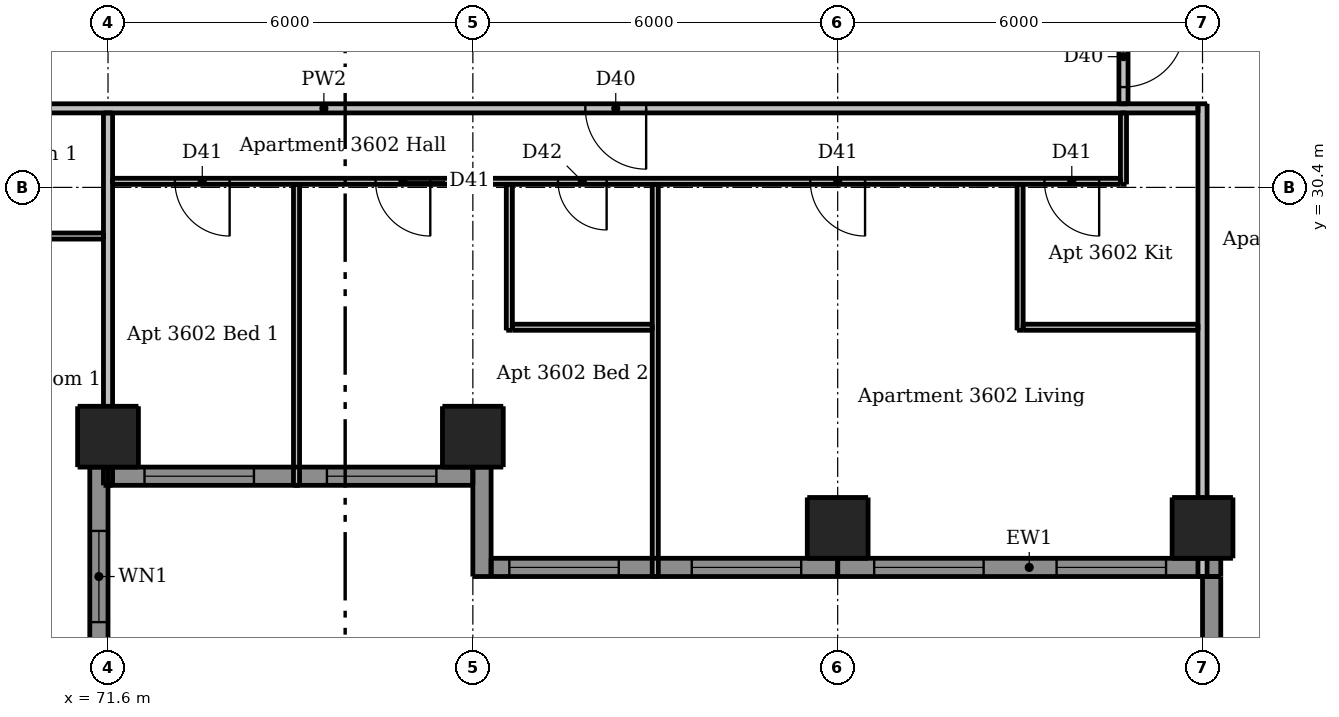
"""IFC4 building model, lengths in metres.
Left out: names, types, materials, properties, quantities, classifications, styles, units other than length and angle.
Written with IfcOpenShell. Run it as: python <this file> out.ifc"""

import sys

from ifc_helpers import new_model, si_unit, direction, frame, frame_2d, origin, origin_2d, place, context, subcontext, project, spatial, rectangle, extrude, element, fill, save


model = new_model("IFC4")
c1 = context("Model", 3, precision=1e-05, world=origin(), true_north=direction((0.0, 1.0)))
c2 = subcontext(c1, "Body", "Model", "MODEL_VIEW")
j1 = project(units=[si_unit("LENGTHUNIT", "METRE"), si_unit("PLANEANGLEUNIT", "RADIAN")], contexts=[c1])
p1 = place(None, origin())
s1 = spatial("IfcSite", under=j1, at=p1, CompositionType="ELEMENT")
p2 = place(p1, origin())
s2 = spatial("IfcBuilding", under=s1, at=p2, CompositionType="ELEMENT")
p3 = place(p2, frame((0.0, 0.0, 137.2)))
s3 = spatial("IfcBuildingStorey", under=s2, at=p3, CompositionType="ELEMENT", Elevation=137.2)
for number, where, z_axis, x_axis in (
    (1, (71.6, 26.3, 0.0), (0.0, 0.0, 1.0), (1.0, 0.0, 0.0)),
    (2, (77.6, 26.3, 0.0), (0.0, 0.0, 1.0), (1.0, 0.0, 0.0)),
    (3, (83.6, 24.8, 0.0), (0.0, 0.0, 1.0), (1.0, 0.0, 0.0)),
    (4, (89.6, 24.8, 0.0), (0.0, 0.0, 1.0), (1.0, 0.0, 0.0)),
):
    element("IfcColumn", number, at=place(p3, frame(where, z_axis=z_axis, x_axis=x_axis)), inside=s3, PredefinedType="COLUMN", context=c2, shape_type="SweptSolid", body=[
        extrude(rectangle(XDim=1.0, YDim=1.0, at=origin_2d()), origin(), (0.0, 0.0, 1.0), 3.05),
    ])
p4 = place(p3, frame((71.45, 22.5, 0.0), z_axis=(0.0, 0.0, 1.0), x_axis=(0.0, 1.0, 0.0)))
e5 = element("IfcWall", 5, at=p4, inside=s3, PredefinedType="SOLIDWALL", context=c2, shape_type="SweptSolid", body=[
    extrude(rectangle(XDim=3.3, YDim=0.3, at=frame_2d((1.65, 0.0))), origin(), (0.0, 0.0, 1.0), 3.05),
])
p5 = place(p4, frame((0.75, 0.0, 0.9)))
e6 = element("IfcOpeningElement", 6, at=p5, cuts=e5, PredefinedType="OPENING", context=c2, shape_type="SweptSolid", body=[
    extrude(rectangle(XDim=1.5, YDim=1.5, at=frame_2d((0.75, 0.75))), frame((0.0, 0.16, 0.0), z_axis=(0.0, -1.0, 0.0), x_axis=(1.0, 0.0, 0.0)), (0.0, 0.0, 1.0), 0.32),
])
p6 = place(p3, frame((77.75, 25.8, 0.0), z_axis=(0.0, 0.0, 1.0), x_axis=(0.0, -1.0, 0.0)))
e7 = element("IfcWall", 7, at=p6, inside=s3, PredefinedType="SOLIDWALL", context=c2, shape_type="SweptSolid", body=[
    extrude(rectangle(XDim=1.8, YDim=0.3, at=frame_2d((0.9, 0.0))), origin(), (0.0, 0.0, 1.0), 3.05),
])
p7 = place(p3, frame((89.75, 24.0, 0.0), z_axis=(0.0, 0.0, 1.0), x_axis=(0.0, -1.0, 0.0)))
e8 = element("IfcWall", 8, at=p7, inside=s3, PredefinedType="SOLIDWALL", context=c2, shape_type="SweptSolid", body=[
    extrude(rectangle(XDim=1.5, YDim=0.3, at=frame_2d((0.75, 0.0))), origin(), (0.0, 0.0, 1.0), 3.05),
])
p8 = place(p3, frame((71.6, 25.65, 0.0), z_axis=(0.0, 0.0, 1.0), x_axis=(1.0, 0.0, 0.0)))
e9 = element("IfcWall", 9, at=p8, inside=s3, PredefinedType="SOLIDWALL", context=c2, shape_type="SweptSolid", body=[
    extrude(rectangle(XDim=6.0, YDim=0.3, at=frame_2d((3.0, 0.0))), origin(), (0.0, 0.0, 1.0), 3.05),
])
p9 = place(p8, frame((0.6, 0.0, 0.15)))
e10 = element("IfcOpeningElement", 10, at=p9, cuts=e9, PredefinedType="OPENING", context=c2, shape_type="SweptSolid", body=[
    extrude(rectangle(XDim=1.8, YDim=2.1, at=frame_2d((0.9, 1.05))), frame((0.0, 0.16, 0.0), z_axis=(0.0, -1.0, 0.0), x_axis=(1.0, 0.0, 0.0)), (0.0, 0.0, 1.0), 0.32),
])
p10 = place(p8, frame((3.6, 0.0, 0.15)))
e11 = element("IfcOpeningElement", 11, at=p10, cuts=e9, PredefinedType="OPENING", context=c2, shape_type="SweptSolid", body=[
    extrude(rectangle(XDim=1.8, YDim=2.1, at=frame_2d((0.9, 1.05))), frame((0.0, 0.16, 0.0), z_axis=(0.0, -1.0, 0.0), x_axis=(1.0, 0.0, 0.0)), (0.0, 0.0, 1.0), 0.32),
])
p11 = place(p3, frame((77.9, 24.15, 0.0), z_axis=(0.0, 0.0, 1.0), x_axis=(1.0, 0.0, 0.0)))
e12 = element("IfcWall", 12, at=p11, inside=s3, PredefinedType="SOLIDWALL", context=c2, shape_type="SweptSolid", body=[
    extrude(rectangle(XDim=5.7, YDim=0.3, at=frame_2d((2.85, 0.0))), origin(), (0.0, 0.0, 1.0), 3.05),
])
p12 = place(p11, frame((0.3, 0.0, 0.15)))
e13 = element("IfcOpeningElement", 13, at=p12, cuts=e12, PredefinedType="OPENING", context=c2, shape_type="SweptSolid", body=[
    extrude(rectangle(XDim=1.8, YDim=2.1, at=frame_2d((0.9, 1.05))), frame((0.0, 0.16, 0.0), z_axis=(0.0, -1.0, 0.0), x_axis=(1.0, 0.0, 0.0)), (0.0, 0.0, 1.0), 0.32),
])
p13 = place(p11, frame((3.3, 0.0, 0.15)))
e14 = element("IfcOpeningElement", 14, at=p13, cuts=e12, PredefinedType="OPENING", context=c2, shape_type="SweptSolid", body=[
    extrude(rectangle(XDim=1.8, YDim=2.1, at=frame_2d((0.9, 1.05))), frame((0.0, 0.16, 0.0), z_axis=(0.0, -1.0, 0.0), x_axis=(1.0, 0.0, 0.0)), (0.0, 0.0, 1.0), 0.32),
])
p14 = place(p3, frame((83.6, 24.15, 0.0), z_axis=(0.0, 0.0, 1.0), x_axis=(1.0, 0.0, 0.0)))
e15 = element("IfcWall", 15, at=p14, inside=s3, PredefinedType="SOLIDWALL", context=c2, shape_type="SweptSolid", body=[
    extrude(rectangle(XDim=6.3, YDim=0.3, at=frame_2d((3.15, 0.0))), origin(), (0.0, 0.0, 1.0), 3.05),
])
p15 = place(p14, frame((0.6, 0.0, 0.15)))
e16 = element("IfcOpeningElement", 16, at=p15, cuts=e15, PredefinedType="OPENING", context=c2, shape_type="SweptSolid", body=[
    extrude(rectangle(XDim=1.8, YDim=2.1, at=frame_2d((0.9, 1.05))), frame((0.0, 0.16, 0.0), z_axis=(0.0, -1.0, 0.0), x_axis=(1.0, 0.0, 0.0)), (0.0, 0.0, 1.0), 0.32),
])
p16 = place(p14, frame((3.6, 0.0, 0.15)))
e17 = element("IfcOpeningElement", 17, at=p16, cuts=e15, PredefinedType="OPENING", context=c2, shape_type="SweptSolid", body=[
    extrude(rectangle(XDim=1.8, YDim=2.1, at=frame_2d((0.9, 1.05))), frame((0.0, 0.16, 0.0), z_axis=(0.0, -1.0, 0.0), x_axis=(1.0, 0.0, 0.0)), (0.0, 0.0, 1.0), 0.32),
])
p17 = place(p3, frame((74.7, 25.5, 0.0), z_axis=(0.0, 0.0, 1.0), x_axis=(0.0, 1.0, 0.0)))
e18 = element("IfcWall", 18, at=p17, inside=s3, PredefinedType="PARTITIONING", context=c2, shape_type="SweptSolid", body=[
    extrude(rectangle(XDim=4.95, YDim=0.1, at=frame_2d((2.475, 0.0))), origin(), (0.0, 0.0, 1.0), 3.05),
])
p18 = place(p3, frame((78.2, 28.05, 0.0), z_axis=(0.0, 0.0, 1.0), x_axis=(0.0, 1.0, 0.0)))
e19 = element("IfcWall", 19, at=p18, inside=s3, PredefinedType="PARTITIONING", context=c2, shape_type="SweptSolid", body=[
    extrude(rectangle(XDim=2.4, YDim=0.1, at=frame_2d((1.2, 0.0))), origin(), (0.0, 0.0, 1.0), 3.05),
])
p19 = place(p3, frame((80.6, 24.0, 0.0), z_axis=(0.0, 0.0, 1.0), x_axis=(0.0, 1.0, 0.0)))
e20 = element("IfcWall", 20, at=p19, inside=s3, PredefinedType="PARTITIONING", context=c2, shape_type="SweptSolid", body=[
    extrude(rectangle(XDim=6.45, YDim=0.1, at=frame_2d((3.225, 0.0))), origin(), (0.0, 0.0, 1.0), 3.05),
])
p20 = place(p3, frame((86.6, 28.05, 0.0), z_axis=(0.0, 0.0, 1.0), x_axis=(0.0, 1.0, 0.0)))
e21 = element("IfcWall", 21, at=p20, inside=s3, PredefinedType="PARTITIONING", context=c2, shape_type="SweptSolid", body=[
    extrude(rectangle(XDim=2.4, YDim=0.1, at=frame_2d((1.2, 0.0))), origin(), (0.0, 0.0, 1.0), 3.05),
])
p21 = place(p3, frame((88.3, 30.45, 0.0), z_axis=(0.0, 0.0, 1.0), x_axis=(0.0, 1.0, 0.0)))
e22 = element("IfcWall", 22, at=p21, inside=s3, PredefinedType="PARTITIONING", context=c2, shape_type="SweptSolid", body=[
    extrude(rectangle(XDim=1.175, YDim=0.1, at=frame_2d((0.587, 0.0))), origin(), (0.0, 0.0, 1.0), 3.05),
])
p22 = place(p3, frame((88.25, 30.5, 0.0), z_axis=(0.0, 0.0, 1.0), x_axis=(-1.0, 0.0, 0.0)))
e23 = element("IfcWall", 23, at=p22, inside=s3, PredefinedType="PARTITIONING", context=c2, shape_type="SweptSolid", body=[
    extrude(rectangle(XDim=16.575, YDim=0.1, at=frame_2d((8.288, 0.0))), origin(), (0.0, 0.0, 1.0), 3.05),
])
p23 = place(p22, frame((4.2, 0.0, 0.0)))
e24 = element("IfcOpeningElement", 24, at=p23, cuts=e23, PredefinedType="OPENING", context=c2, shape_type="SweptSolid", body=[
    extrude(rectangle(XDim=0.9, YDim=2.1, at=frame_2d((0.45, 1.05))), frame((0.0, 0.06, 0.0), z_axis=(0.0, -1.0, 0.0), x_axis=(1.0, 0.0, 0.0)), (0.0, 0.0, 1.0), 0.12),
])
p24 = place(p22, frame((0.35, 0.0, 0.0)))
e25 = element("IfcOpeningElement", 25, at=p24, cuts=e23, PredefinedType="OPENING", context=c2, shape_type="SweptSolid", body=[
    extrude(rectangle(XDim=0.9, YDim=2.1, at=frame_2d((0.45, 1.05))), frame((0.0, 0.06, 0.0), z_axis=(0.0, -1.0, 0.0), x_axis=(1.0, 0.0, 0.0)), (0.0, 0.0, 1.0), 0.12),
])
p25 = place(p22, frame((14.65, 0.0, 0.0)))
e26 = element("IfcOpeningElement", 26, at=p25, cuts=e23, PredefinedType="OPENING", context=c2, shape_type="SweptSolid", body=[
    extrude(rectangle(XDim=0.9, YDim=2.1, at=frame_2d((0.45, 1.05))), frame((0.0, 0.06, 0.0), z_axis=(0.0, -1.0, 0.0), x_axis=(1.0, 0.0, 0.0)), (0.0, 0.0, 1.0), 0.12),
])
p26 = place(p22, frame((11.35, 0.0, 0.0)))
e27 = element("IfcOpeningElement", 27, at=p26, cuts=e23, PredefinedType="OPENING", context=c2, shape_type="SweptSolid", body=[
    extrude(rectangle(XDim=0.9, YDim=2.1, at=frame_2d((0.45, 1.05))), frame((0.0, 0.06, 0.0), z_axis=(0.0, -1.0, 0.0), x_axis=(1.0, 0.0, 0.0)), (0.0, 0.0, 1.0), 0.12),
])
p27 = place(p22, frame((8.45, 0.0, 0.0)))
e28 = element("IfcOpeningElement", 28, at=p27, cuts=e23, PredefinedType="OPENING", context=c2, shape_type="SweptSolid", body=[
    extrude(rectangle(XDim=0.8, YDim=2.1, at=frame_2d((0.4, 1.05))), frame((0.0, 0.06, 0.0), z_axis=(0.0, -1.0, 0.0), x_axis=(1.0, 0.0, 0.0)), (0.0, 0.0, 1.0), 0.12),
])
p28 = place(p3, frame((65.65, 29.6, 0.0), z_axis=(0.0, 0.0, 1.0), x_axis=(1.0, 0.0, 0.0)))
e29 = element("IfcWall", 29, at=p28, inside=s3, PredefinedType="PARTITIONING", context=c2, shape_type="SweptSolid", body=[
    extrude(rectangle(XDim=5.875, YDim=0.1, at=frame_2d((2.938, 0.0))), origin(), (0.0, 0.0, 1.0), 3.05),
])
p29 = place(p28, frame((3.75, 0.0, 0.0)))
e30 = element("IfcOpeningElement", 30, at=p29, cuts=e29, PredefinedType="OPENING", context=c2, shape_type="SweptSolid", body=[
    extrude(rectangle(XDim=0.8, YDim=2.1, at=frame_2d((0.4, 1.05))), frame((0.0, 0.06, 0.0), z_axis=(0.0, -1.0, 0.0), x_axis=(1.0, 0.0, 0.0)), (0.0, 0.0, 1.0), 0.12),
])
p30 = place(p3, frame((78.25, 28.1, 0.0), z_axis=(0.0, 0.0, 1.0), x_axis=(1.0, 0.0, 0.0)))
e31 = element("IfcWall", 31, at=p30, inside=s3, PredefinedType="PARTITIONING", context=c2, shape_type="SweptSolid", body=[
    extrude(rectangle(XDim=2.3, YDim=0.1, at=frame_2d((1.15, 0.0))), origin(), (0.0, 0.0, 1.0), 3.05),
])
p31 = place(p3, frame((86.65, 28.1, 0.0), z_axis=(0.0, 0.0, 1.0), x_axis=(1.0, 0.0, 0.0)))
e32 = element("IfcWall", 32, at=p31, inside=s3, PredefinedType="PARTITIONING", context=c2, shape_type="SweptSolid", body=[
    extrude(rectangle(XDim=2.875, YDim=0.1, at=frame_2d((1.438, 0.0))), origin(), (0.0, 0.0, 1.0), 3.05),
])
p32 = place(p3, frame((71.6, 25.5, 0.0), z_axis=(0.0, 0.0, 1.0), x_axis=(0.0, 1.0, 0.0)))
e33 = element("IfcWall", 33, at=p32, inside=s3, PredefinedType="PARTITIONING", context=c2, shape_type="SweptSolid", body=[
    extrude(rectangle(XDim=6.125, YDim=0.15, at=frame_2d((3.062, 0.0))), origin(), (0.0, 0.0, 1.0), 2.59),
])
p33 = place(p3, frame((88.3, 60.475, 0.0), z_axis=(0.0, 0.0, 1.0), x_axis=(0.0, -1.0, 0.0)))
e34 = element("IfcWall", 34, at=p33, inside=s3, PredefinedType="PARTITIONING", context=c2, shape_type="SweptSolid", body=[
    extrude(rectangle(XDim=28.7, YDim=0.15, at=frame_2d((14.35, 0.0))), origin(), (0.0, 0.0, 1.0), 3.05),
])
p34 = place(p33, frame((27.425, 0.0, 0.0)))
e35 = element("IfcOpeningElement", 35, at=p34, cuts=e34, PredefinedType="OPENING", context=c2, shape_type="SweptSolid", body=[
    extrude(rectangle(XDim=1.0, YDim=2.1, at=frame_2d((0.5, 1.05))), frame((0.0, 0.085, 0.0), z_axis=(0.0, -1.0, 0.0), x_axis=(1.0, 0.0, 0.0)), (0.0, 0.0, 1.0), 0.17),
])
p35 = place(p33, frame((10.575, 0.0, 0.0)))
e36 = element("IfcOpeningElement", 36, at=p35, cuts=e34, PredefinedType="OPENING", context=c2, shape_type="SweptSolid", body=[
    extrude(rectangle(XDim=1.0, YDim=2.1, at=frame_2d((0.5, 1.05))), frame((0.0, 0.085, 0.0), z_axis=(0.0, -1.0, 0.0), x_axis=(1.0, 0.0, 0.0)), (0.0, 0.0, 1.0), 0.17),
])
p36 = place(p3, frame((89.6, 24.0, 0.0), z_axis=(0.0, 0.0, 1.0), x_axis=(0.0, 1.0, 0.0)))
e37 = element("IfcWall", 37, at=p36, inside=s3, PredefinedType="PARTITIONING", context=c2, shape_type="SweptSolid", body=[
    extrude(rectangle(XDim=7.775, YDim=0.15, at=frame_2d((3.887, 0.0))), origin(), (0.0, 0.0, 1.0), 2.51),
])
p37 = place(p3, frame((89.525, 31.7, 0.0), z_axis=(0.0, 0.0, 1.0), x_axis=(-1.0, 0.0, 0.0)))
e38 = element("IfcWall", 38, at=p37, inside=s3, PredefinedType="PARTITIONING", context=c2, shape_type="SweptSolid", body=[
    extrude(rectangle(XDim=28.75, YDim=0.15, at=frame_2d((14.375, 0.0))), origin(), (0.0, 0.0, 1.0), 3.05),
])
p38 = place(p37, frame((25.875, 0.0, 0.0)))
e39 = element("IfcOpeningElement", 39, at=p38, cuts=e38, PredefinedType="OPENING", context=c2, shape_type="SweptSolid", body=[
    extrude(rectangle(XDim=1.0, YDim=2.1, at=frame_2d((0.5, 1.05))), frame((0.0, 0.085, 0.0), z_axis=(0.0, -1.0, 0.0), x_axis=(1.0, 0.0, 0.0)), (0.0, 0.0, 1.0), 0.17),
])
p39 = place(p37, frame((9.075, 0.0, 0.0)))
e40 = element("IfcOpeningElement", 40, at=p39, cuts=e38, PredefinedType="OPENING", context=c2, shape_type="SweptSolid", body=[
    extrude(rectangle(XDim=1.0, YDim=2.1, at=frame_2d((0.5, 1.05))), frame((0.0, 0.085, 0.0), z_axis=(0.0, -1.0, 0.0), x_axis=(1.0, 0.0, 0.0)), (0.0, 0.0, 1.0), 0.17),
])
p40 = place(p5, origin())
e41 = element("IfcWindow", 41, at=p40, inside=s3, PartitioningType="DOUBLE_PANEL_VERTICAL", PredefinedType="WINDOW", context=c2, shape_type="SweptSolid", body=[
    extrude(rectangle(XDim=1.5, YDim=1.5, at=frame_2d((0.75, 0.75))), frame((0.0, 0.03, 0.0), z_axis=(0.0, -1.0, 0.0), x_axis=(1.0, 0.0, 0.0)), (0.0, 0.0, 1.0), 0.06),
])
fill(e6, e41)
p41 = place(p9, origin())
e42 = element("IfcWindow", 42, at=p41, inside=s3, PartitioningType="DOUBLE_PANEL_VERTICAL", PredefinedType="WINDOW", context=c2, shape_type="SweptSolid", body=[
    extrude(rectangle(XDim=1.8, YDim=2.1, at=frame_2d((0.9, 1.05))), frame((0.0, 0.03, 0.0), z_axis=(0.0, -1.0, 0.0), x_axis=(1.0, 0.0, 0.0)), (0.0, 0.0, 1.0), 0.06),
])
fill(e10, e42)
p42 = place(p10, origin())
e43 = element("IfcWindow", 43, at=p42, inside=s3, PartitioningType="DOUBLE_PANEL_VERTICAL", PredefinedType="WINDOW", context=c2, shape_type="SweptSolid", body=[
    extrude(rectangle(XDim=1.8, YDim=2.1, at=frame_2d((0.9, 1.05))), frame((0.0, 0.03, 0.0), z_axis=(0.0, -1.0, 0.0), x_axis=(1.0, 0.0, 0.0)), (0.0, 0.0, 1.0), 0.06),
])
fill(e11, e43)
p43 = place(p12, origin())
e44 = element("IfcWindow", 44, at=p43, inside=s3, PartitioningType="DOUBLE_PANEL_VERTICAL", PredefinedType="WINDOW", context=c2, shape_type="SweptSolid", body=[
    extrude(rectangle(XDim=1.8, YDim=2.1, at=frame_2d((0.9, 1.05))), frame((0.0, 0.03, 0.0), z_axis=(0.0, -1.0, 0.0), x_axis=(1.0, 0.0, 0.0)), (0.0, 0.0, 1.0), 0.06),
])
fill(e13, e44)
p44 = place(p13, origin())
e45 = element("IfcWindow", 45, at=p44, inside=s3, PartitioningType="DOUBLE_PANEL_VERTICAL", PredefinedType="WINDOW", context=c2, shape_type="SweptSolid", body=[
    extrude(rectangle(XDim=1.8, YDim=2.1, at=frame_2d((0.9, 1.05))), frame((0.0, 0.03, 0.0), z_axis=(0.0, -1.0, 0.0), x_axis=(1.0, 0.0, 0.0)), (0.0, 0.0, 1.0), 0.06),
])
fill(e14, e45)
p45 = place(p15, origin())
e46 = element("IfcWindow", 46, at=p45, inside=s3, PartitioningType="DOUBLE_PANEL_VERTICAL", PredefinedType="WINDOW", context=c2, shape_type="SweptSolid", body=[
    extrude(rectangle(XDim=1.8, YDim=2.1, at=frame_2d((0.9, 1.05))), frame((0.0, 0.03, 0.0), z_axis=(0.0, -1.0, 0.0), x_axis=(1.0, 0.0, 0.0)), (0.0, 0.0, 1.0), 0.06),
])
fill(e16, e46)
p46 = place(p16, origin())
e47 = element("IfcWindow", 47, at=p46, inside=s3, PartitioningType="DOUBLE_PANEL_VERTICAL", PredefinedType="WINDOW", context=c2, shape_type="SweptSolid", body=[
    extrude(rectangle(XDim=1.8, YDim=2.1, at=frame_2d((0.9, 1.05))), frame((0.0, 0.03, 0.0), z_axis=(0.0, -1.0, 0.0), x_axis=(1.0, 0.0, 0.0)), (0.0, 0.0, 1.0), 0.06),
])
fill(e17, e47)
p47 = place(p39, origin())
e48 = element("IfcDoor", 48, at=p47, inside=s3, OperationType="SINGLE_SWING_LEFT", PredefinedType="DOOR", context=c2, shape_type="SweptSolid", body=[
    extrude(rectangle(XDim=1.0, YDim=2.1, at=frame_2d((0.5, 1.05))), frame((0.0, 0.025, 0.0), z_axis=(0.0, -1.0, 0.0), x_axis=(1.0, 0.0, 0.0)), (0.0, 0.0, 1.0), 0.05),
])
fill(e40, e48)
p48 = place(p23, origin())
e49 = element("IfcDoor", 49, at=p48, inside=s3, OperationType="SINGLE_SWING_LEFT", PredefinedType="DOOR", context=c2, shape_type="SweptSolid", body=[
    extrude(rectangle(XDim=0.9, YDim=2.1, at=frame_2d((0.45, 1.05))), frame((0.0, 0.025, 0.0), z_axis=(0.0, -1.0, 0.0), x_axis=(1.0, 0.0, 0.0)), (0.0, 0.0, 1.0), 0.05),
])
fill(e24, e49)
p49 = place(p24, origin())
e50 = element("IfcDoor", 50, at=p49, inside=s3, OperationType="SINGLE_SWING_LEFT", PredefinedType="DOOR", context=c2, shape_type="SweptSolid", body=[
    extrude(rectangle(XDim=0.9, YDim=2.1, at=frame_2d((0.45, 1.05))), frame((0.0, 0.025, 0.0), z_axis=(0.0, -1.0, 0.0), x_axis=(1.0, 0.0, 0.0)), (0.0, 0.0, 1.0), 0.05),
])
fill(e25, e50)
p50 = place(p25, origin())
e51 = element("IfcDoor", 51, at=p50, inside=s3, OperationType="SINGLE_SWING_LEFT", PredefinedType="DOOR", context=c2, shape_type="SweptSolid", body=[
    extrude(rectangle(XDim=0.9, YDim=2.1, at=frame_2d((0.45, 1.05))), frame((0.0, 0.025, 0.0), z_axis=(0.0, -1.0, 0.0), x_axis=(1.0, 0.0, 0.0)), (0.0, 0.0, 1.0), 0.05),
])
fill(e26, e51)
p51 = place(p26, origin())
e52 = element("IfcDoor", 52, at=p51, inside=s3, OperationType="SINGLE_SWING_LEFT", PredefinedType="DOOR", context=c2, shape_type="SweptSolid", body=[
    extrude(rectangle(XDim=0.9, YDim=2.1, at=frame_2d((0.45, 1.05))), frame((0.0, 0.025, 0.0), z_axis=(0.0, -1.0, 0.0), x_axis=(1.0, 0.0, 0.0)), (0.0, 0.0, 1.0), 0.05),
])
fill(e27, e52)
p52 = place(p27, origin())
e53 = element("IfcDoor", 53, at=p52, inside=s3, OperationType="SINGLE_SWING_LEFT", PredefinedType="DOOR", context=c2, shape_type="SweptSolid", body=[
    extrude(rectangle(XDim=0.8, YDim=2.1, at=frame_2d((0.4, 1.05))), frame((0.0, 0.025, 0.0), z_axis=(0.0, -1.0, 0.0), x_axis=(1.0, 0.0, 0.0)), (0.0, 0.0, 1.0), 0.05),
])
fill(e28, e53)
p53 = place(p34, origin())
e54 = element("IfcDoor", 54, at=p53, inside=s3, OperationType="SINGLE_SWING_LEFT", PredefinedType="DOOR", context=c2, shape_type="SweptSolid", body=[
    extrude(rectangle(XDim=1.0, YDim=2.1, at=frame_2d((0.5, 1.05))), frame((0.0, 0.025, 0.0), z_axis=(0.0, -1.0, 0.0), x_axis=(1.0, 0.0, 0.0)), (0.0, 0.0, 1.0), 0.05),
])
fill(e35, e54)
save(model, sys.argv[1])
